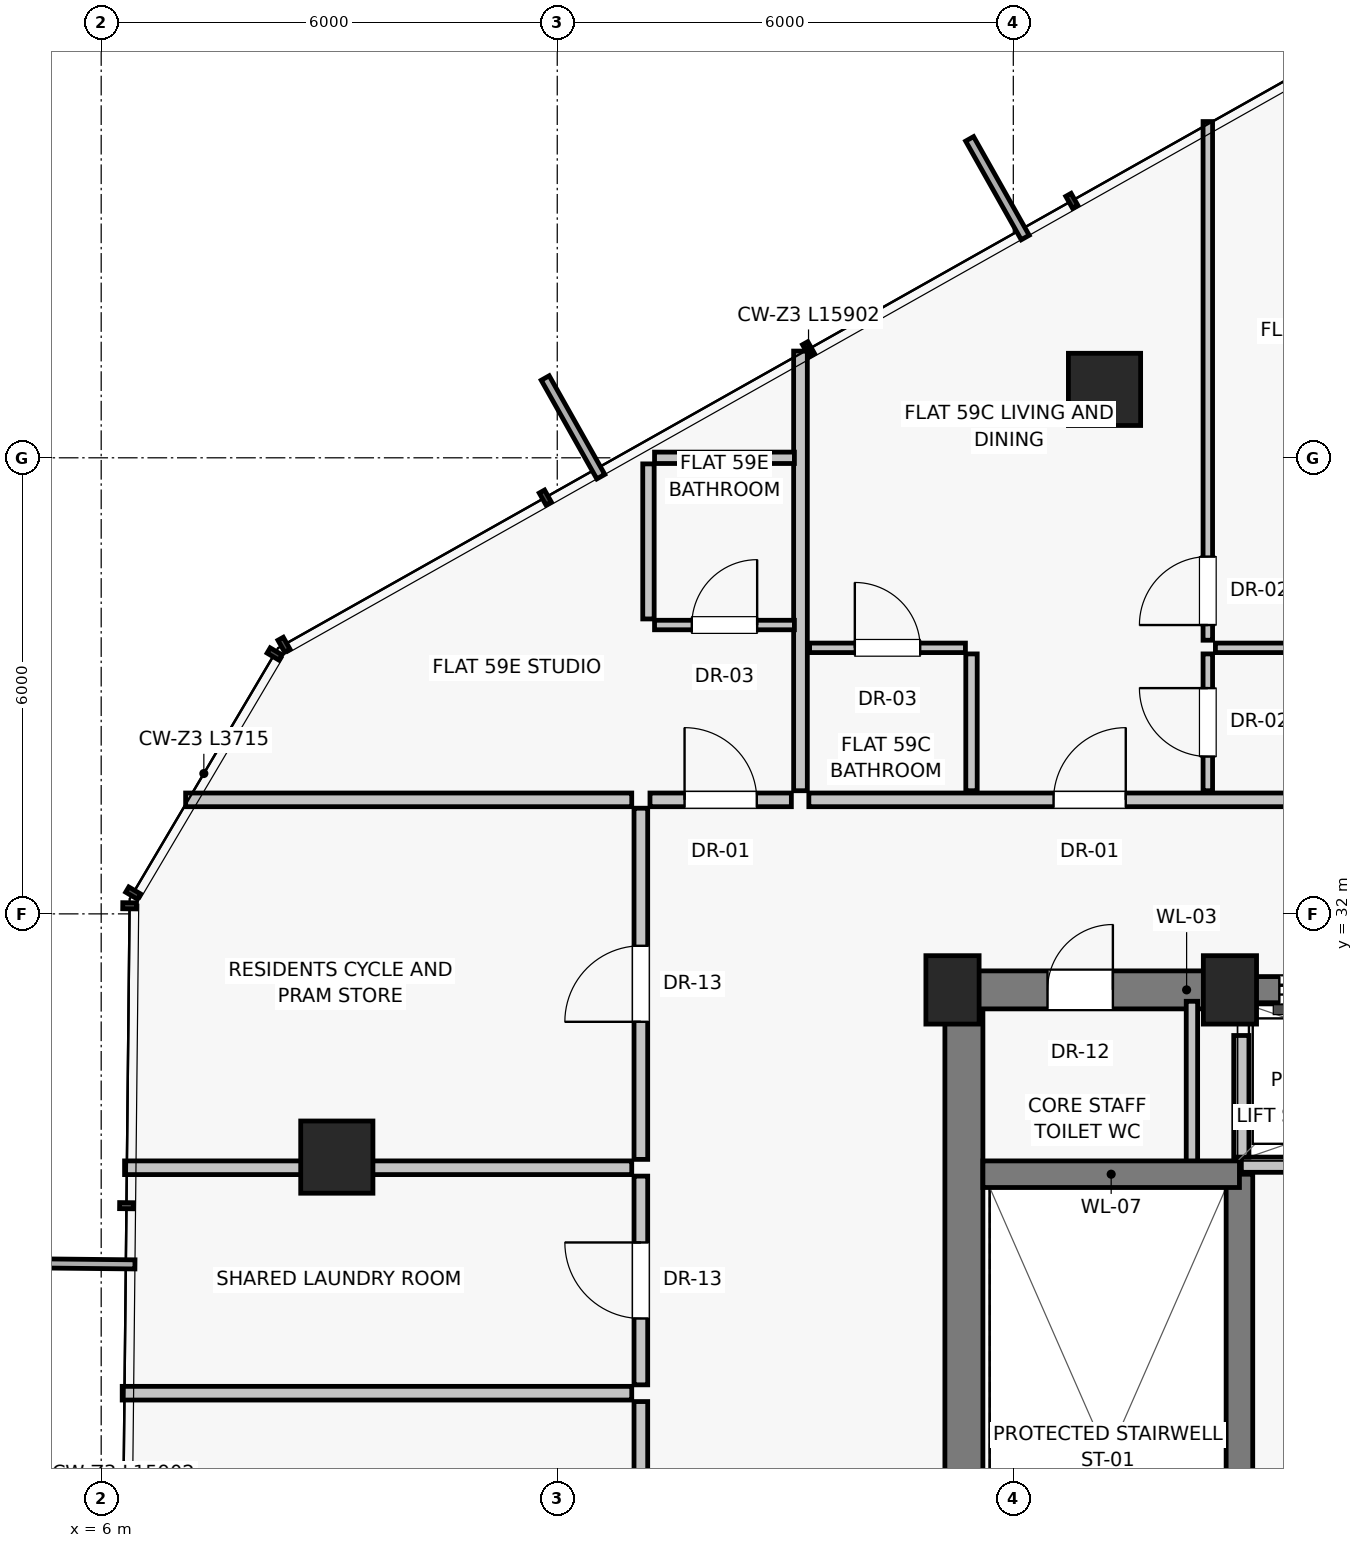
"""IFC4 building model, lengths in metres.
Left out: names, types, materials, properties, quantities, classifications, styles, units other than length and angle.
Written with IfcOpenShell. Run it as: python <this file> out.ifc"""

import sys

from ifc_helpers import new_model, si_unit, direction, frame, frame_2d, origin, origin_2d, place, context, subcontext, project, spatial, rectangle, extrude, source, transform, mapped, element, fill, save


model = new_model("IFC4")
c1 = context("Model", 3, precision=1e-05, world=origin(), true_north=direction((0.0, 1.0)))
c2 = subcontext(c1, "Body", "Model", "MODEL_VIEW")
j1 = project(units=[si_unit("LENGTHUNIT", "METRE"), si_unit("PLANEANGLEUNIT", "RADIAN")], contexts=[c1])
p1 = place(None, origin())
s1 = spatial("IfcSite", under=j1, at=p1, CompositionType="ELEMENT")
p2 = place(p1, origin())
s2 = spatial("IfcBuilding", under=s1, at=p2, CompositionType="ELEMENT")
p3 = place(p2, frame((0.0, 0.0, 208.1)))
s3 = spatial("IfcBuildingStorey", under=s2, at=p3, CompositionType="ELEMENT", Elevation=208.1)
for number, where, z_axis, x_axis in (
    (1, (17.2, 31.0, 0.0), (0.0, 0.0, 1.0), (1.0, 0.0, 0.0)),
    (2, (20.85, 31.0, 0.0), (0.0, 0.0, 1.0), (1.0, 0.0, 0.0)),
):
    element("IfcColumn", number, at=place(p3, frame(where, z_axis=z_axis, x_axis=x_axis)), inside=s3, PredefinedType="PILASTER", context=c2, shape_type="SweptSolid", body=[
        extrude(rectangle(XDim=0.7, YDim=0.9, at=origin_2d()), origin(), (0.0, 0.0, 1.0), 3.25),
    ])
for number, where, z_axis, x_axis in (
    (3, (19.2, 38.9, 0.0), (0.0, 0.0, 1.0), (1.0, 0.0, 0.0)),
    (4, (9.1, 28.8, 0.0), (0.0, 0.0, 1.0), (1.0, 0.0, 0.0)),
):
    element("IfcColumn", number, at=place(p3, frame(where, z_axis=z_axis, x_axis=x_axis)), inside=s3, PredefinedType="COLUMN", context=c2, shape_type="SweptSolid", body=[
        extrude(rectangle(XDim=0.95, YDim=0.95, at=origin_2d()), origin(), (0.0, 0.0, 1.0), 3.25),
    ])
p4 = place(p3, frame((17.35, 16.8, 0.0), z_axis=(0.0, 0.0, 1.0), x_axis=(0.0, 1.0, 0.0)))
e5 = element("IfcWall", 5, at=p4, inside=s3, PredefinedType="SHEAR", context=c2, shape_type="SweptSolid", body=[
    extrude(rectangle(XDim=14.2, YDim=0.5, at=frame_2d((7.1, 0.0))), origin(), (0.0, 0.0, 1.0), 2.97),
])
p5 = place(p3, frame((17.2, 31.0, 0.0), z_axis=(0.0, 0.0, 1.0), x_axis=(1.0, 0.0, 0.0)))
e6 = element("IfcWall", 6, at=p5, inside=s3, PredefinedType="SHEAR", context=c2, shape_type="SweptSolid", body=[
    extrude(rectangle(XDim=3.8, YDim=0.5, at=frame_2d((1.9, 0.0))), origin(), (0.0, 0.0, 1.0), 2.97),
])
p6 = place(p5, frame((1.25, 0.0, 0.0)))
e7 = element("IfcOpeningElement", 7, at=p6, cuts=e6, PredefinedType="OPENING", context=c2, shape_type="SweptSolid", body=[
    extrude(rectangle(XDim=0.86, YDim=2.01, at=frame_2d((0.43, 1.005))), frame((0.0, 0.26, 0.0), z_axis=(0.0, -1.0, 0.0), x_axis=(1.0, 0.0, 0.0)), (0.0, 0.0, 1.0), 0.52),
])
p7 = place(p3, frame((21.0, 31.0, 0.0), z_axis=(0.0, 0.0, 1.0), x_axis=(1.0, 0.0, 0.0)))
e8 = element("IfcWall", 8, at=p7, inside=s3, PredefinedType="SHEAR", context=c2, shape_type="SweptSolid", body=[
    extrude(rectangle(XDim=6.0, YDim=0.35, at=frame_2d((3.0, 0.0))), origin(), (0.0, 0.0, 1.0), 2.97),
])
p8 = place(p7, frame((0.5, 0.0, 0.0)))
e9 = element("IfcOpeningElement", 9, at=p8, cuts=e8, PredefinedType="OPENING", context=c2, shape_type="SweptSolid", body=[
    extrude(rectangle(XDim=1.1, YDim=2.08, at=frame_2d((0.55, 1.04))), frame((0.0, 0.185, 0.0), z_axis=(0.0, -1.0, 0.0), x_axis=(1.0, 0.0, 0.0)), (0.0, 0.0, 1.0), 0.37),
])
p9 = place(p7, frame((2.45, 0.0, 0.0)))
e10 = element("IfcOpeningElement", 10, at=p9, cuts=e8, PredefinedType="OPENING", context=c2, shape_type="SweptSolid", body=[
    extrude(rectangle(XDim=1.1, YDim=2.08, at=frame_2d((0.55, 1.04))), frame((0.0, 0.185, 0.0), z_axis=(0.0, -1.0, 0.0), x_axis=(1.0, 0.0, 0.0)), (0.0, 0.0, 1.0), 0.37),
])
p10 = place(p7, frame((4.4, 0.0, 0.0)))
e11 = element("IfcOpeningElement", 11, at=p10, cuts=e8, PredefinedType="OPENING", context=c2, shape_type="SweptSolid", body=[
    extrude(rectangle(XDim=1.1, YDim=2.08, at=frame_2d((0.55, 1.04))), frame((0.0, 0.185, 0.0), z_axis=(0.0, -1.0, 0.0), x_axis=(1.0, 0.0, 0.0)), (0.0, 0.0, 1.0), 0.37),
])
p11 = place(p3, frame((20.35, 28.65, 0.0), z_axis=(0.0, 0.0, 1.0), x_axis=(0.0, 1.0, 0.0)))
e12 = element("IfcWall", 12, at=p11, inside=s3, PredefinedType="PARTITIONING", context=c2, shape_type="SweptSolid", body=[
    extrude(rectangle(XDim=2.2, YDim=0.15, at=frame_2d((1.1, 0.0))), origin(), (0.0, 0.0, 1.0), 2.97),
])
p12 = place(p3, frame((20.975, 19.8, 0.0), z_axis=(0.0, 0.0, 1.0), x_axis=(0.0, 1.0, 0.0)))
e13 = element("IfcWall", 13, at=p12, inside=s3, PredefinedType="SHEAR", context=c2, shape_type="SweptSolid", body=[
    extrude(rectangle(XDim=8.775, YDim=0.35, at=frame_2d((4.387, 0.0))), origin(), (0.0, 0.0, 1.0), 2.97),
])
p13 = place(p3, frame((17.6, 28.575, 0.0), z_axis=(0.0, 0.0, 1.0), x_axis=(1.0, 0.0, 0.0)))
e14 = element("IfcWall", 14, at=p13, inside=s3, PredefinedType="SHEAR", context=c2, shape_type="SweptSolid", body=[
    extrude(rectangle(XDim=3.375, YDim=0.35, at=frame_2d((1.688, 0.0))), origin(), (0.0, 0.0, 1.0), 2.97),
])
p14 = place(p3, frame((21.0, 28.7, 0.0), z_axis=(0.0, 0.0, 1.0), x_axis=(1.0, 0.0, 0.0)))
e15 = element("IfcWall", 15, at=p14, inside=s3, PredefinedType="SOLIDWALL", context=c2, shape_type="SweptSolid", body=[
    extrude(rectangle(XDim=6.0, YDim=0.2, at=frame_2d((3.0, 0.0))), origin(), (0.0, 0.0, 1.0), 2.97),
])
p15 = place(p3, frame((21.0, 28.8, 0.0), z_axis=(0.0, 0.0, 1.0), x_axis=(0.0, 1.0, 0.0)))
e16 = element("IfcWall", 16, at=p15, inside=s3, PredefinedType="SOLIDWALL", context=c2, shape_type="SweptSolid", body=[
    extrude(rectangle(XDim=1.6, YDim=0.2, at=frame_2d((0.8, 0.0))), origin(), (0.0, 0.0, 1.0), 2.97),
])
p16 = place(p3, frame((15.2, 33.62, 0.0), z_axis=(0.0, 0.0, 1.0), x_axis=(0.0, 1.0, 0.0)))
e17 = element("IfcWall", 17, at=p16, inside=s3, PredefinedType="PARTITIONING", context=c2, shape_type="SweptSolid", body=[
    extrude(rectangle(XDim=5.784, YDim=0.18, at=frame_2d((2.892, 0.0))), origin(), (0.0, 0.0, 1.0), 2.97),
])
p17 = place(p3, frame((15.31, 33.5, 0.0), z_axis=(0.0, 0.0, 1.0), x_axis=(1.0, 0.0, 0.0)))
e18 = element("IfcWall", 18, at=p17, inside=s3, PredefinedType="PARTITIONING", context=c2, shape_type="SweptSolid", body=[
    extrude(rectangle(XDim=9.35, YDim=0.18, at=frame_2d((4.675, 0.0))), origin(), (0.0, 0.0, 1.0), 2.97),
])
p18 = place(p17, frame((3.219, 0.0, 0.0)))
e19 = element("IfcOpeningElement", 19, at=p18, cuts=e18, PredefinedType="OPENING", context=c2, shape_type="SweptSolid", body=[
    extrude(rectangle(XDim=0.95, YDim=2.02, at=frame_2d((0.475, 1.01))), frame((0.0, 0.1, 0.0), z_axis=(0.0, -1.0, 0.0), x_axis=(1.0, 0.0, 0.0)), (0.0, 0.0, 1.0), 0.2),
])
p19 = place(p3, frame((17.45, 33.62, 0.0), z_axis=(0.0, 0.0, 1.0), x_axis=(0.0, 1.0, 0.0)))
e20 = element("IfcWall", 20, at=p19, inside=s3, PredefinedType="PARTITIONING", context=c2, shape_type="SweptSolid", body=[
    extrude(rectangle(XDim=1.8, YDim=0.15, at=frame_2d((0.9, 0.0))), origin(), (0.0, 0.0, 1.0), 2.97),
])
p20 = place(p3, frame((15.32, 35.5, 0.0), z_axis=(0.0, 0.0, 1.0), x_axis=(1.0, 0.0, 0.0)))
e21 = element("IfcWall", 21, at=p20, inside=s3, PredefinedType="PARTITIONING", context=c2, shape_type="SweptSolid", body=[
    extrude(rectangle(XDim=2.05, YDim=0.125, at=frame_2d((1.025, 0.0))), origin(), (0.0, 0.0, 1.0), 2.97),
])
p21 = place(p20, frame((0.595, 0.0, 0.0)))
e22 = element("IfcOpeningElement", 22, at=p21, cuts=e21, PredefinedType="OPENING", context=c2, shape_type="SweptSolid", body=[
    extrude(rectangle(XDim=0.86, YDim=2.01, at=frame_2d((0.43, 1.005))), frame((0.0, 0.073, 0.0), z_axis=(0.0, -1.0, 0.0), x_axis=(1.0, 0.0, 0.0)), (0.0, 0.0, 1.0), 0.145),
])
p22 = place(p3, frame((20.559, 33.62, 0.0), z_axis=(0.0, 0.0, 1.0), x_axis=(0.0, 1.0, 0.0)))
e23 = element("IfcWall", 23, at=p22, inside=s3, PredefinedType="PARTITIONING", context=c2, shape_type="SweptSolid", body=[
    extrude(rectangle(XDim=1.8, YDim=0.125, at=frame_2d((0.9, 0.0))), origin(), (0.0, 0.0, 1.0), 2.424),
])
p23 = place(p22, frame((0.45, 0.0, 0.0)))
e24 = element("IfcOpeningElement", 24, at=p23, cuts=e23, PredefinedType="OPENING", context=c2, shape_type="SweptSolid", body=[
    extrude(rectangle(XDim=0.9, YDim=2.01, at=frame_2d((0.45, 1.005))), frame((0.0, 0.073, 0.0), z_axis=(0.0, -1.0, 0.0), x_axis=(1.0, 0.0, 0.0)), (0.0, 0.0, 1.0), 0.145),
])
p24 = place(p3, frame((20.659, 35.5, 0.0), z_axis=(0.0, 0.0, 1.0), x_axis=(1.0, 0.0, 0.0)))
e25 = element("IfcWall", 25, at=p24, inside=s3, PredefinedType="PARTITIONING", context=c2, shape_type="SweptSolid", body=[
    extrude(rectangle(XDim=3.991, YDim=0.125, at=frame_2d((1.996, 0.0))), origin(), (0.0, 0.0, 1.0), 2.617),
])
p25 = place(p3, frame((20.559, 35.6, 0.0), z_axis=(0.0, 0.0, 1.0), x_axis=(0.0, 1.0, 0.0)))
e26 = element("IfcWall", 26, at=p25, inside=s3, PredefinedType="PARTITIONING", context=c2, shape_type="SweptSolid", body=[
    extrude(rectangle(XDim=6.823, YDim=0.125, at=frame_2d((3.412, 0.0))), origin(), (0.0, 0.0, 1.0), 2.97),
])
p26 = place(p25, frame((0.2, 0.0, 0.0)))
e27 = element("IfcOpeningElement", 27, at=p26, cuts=e26, PredefinedType="OPENING", context=c2, shape_type="SweptSolid", body=[
    extrude(rectangle(XDim=0.9, YDim=2.01, at=frame_2d((0.45, 1.005))), frame((0.0, 0.073, 0.0), z_axis=(0.0, -1.0, 0.0), x_axis=(1.0, 0.0, 0.0)), (0.0, 0.0, 1.0), 0.145),
])
p27 = place(p3, frame((12.98, 33.5, 0.0), z_axis=(0.0, 0.0, 1.0), x_axis=(-1.0, 0.0, 0.0)))
e28 = element("IfcWall", 28, at=p27, inside=s3, PredefinedType="PARTITIONING", context=c2, shape_type="SweptSolid", body=[
    extrude(rectangle(XDim=5.869, YDim=0.18, at=frame_2d((2.935, 0.0))), origin(), (0.0, 0.0, 1.0), 2.97),
])
p28 = place(p3, frame((13.1, 18.74, 0.0), z_axis=(0.0, 0.0, 1.0), x_axis=(0.0, 1.0, 0.0)))
e29 = element("IfcWall", 29, at=p28, inside=s3, PredefinedType="PARTITIONING", context=c2, shape_type="SweptSolid", body=[
    extrude(rectangle(XDim=6.844, YDim=0.18, at=frame_2d((3.422, 0.0))), origin(), (0.0, 0.0, 1.0), 2.617),
])
p29 = place(p28, frame((2.922, 0.0, 0.0)))
e30 = element("IfcOpeningElement", 30, at=p29, cuts=e29, PredefinedType="OPENING", context=c2, shape_type="SweptSolid", body=[
    extrude(rectangle(XDim=1.0, YDim=2.01, at=frame_2d((0.5, 1.005))), frame((0.0, 0.1, 0.0), z_axis=(0.0, -1.0, 0.0), x_axis=(1.0, 0.0, 0.0)), (0.0, 0.0, 1.0), 0.2),
])
p30 = place(p3, frame((12.98, 25.694, 0.0), z_axis=(0.0, 0.0, 1.0), x_axis=(-1.0, 0.0, 0.0)))
e31 = element("IfcWall", 31, at=p30, inside=s3, PredefinedType="PARTITIONING", context=c2, shape_type="SweptSolid", body=[
    extrude(rectangle(XDim=6.703, YDim=0.18, at=frame_2d((3.352, 0.0))), origin(), (0.0, 0.0, 1.0), 2.97),
])
p31 = place(p3, frame((13.1, 25.804, 0.0), z_axis=(0.0, 0.0, 1.0), x_axis=(0.0, 1.0, 0.0)))
e32 = element("IfcWall", 32, at=p31, inside=s3, PredefinedType="PARTITIONING", context=c2, shape_type="SweptSolid", body=[
    extrude(rectangle(XDim=2.746, YDim=0.18, at=frame_2d((1.373, 0.0))), origin(), (0.0, 0.0, 1.0), 2.617),
])
p32 = place(p31, frame((0.873, 0.0, 0.0)))
e33 = element("IfcOpeningElement", 33, at=p32, cuts=e32, PredefinedType="OPENING", context=c2, shape_type="SweptSolid", body=[
    extrude(rectangle(XDim=1.0, YDim=2.01, at=frame_2d((0.5, 1.005))), frame((0.0, 0.1, 0.0), z_axis=(0.0, -1.0, 0.0), x_axis=(1.0, 0.0, 0.0)), (0.0, 0.0, 1.0), 0.2),
])
p33 = place(p3, frame((13.1, 28.77, 0.0), z_axis=(0.0, 0.0, 1.0), x_axis=(0.0, 1.0, 0.0)))
e34 = element("IfcWall", 34, at=p33, inside=s3, PredefinedType="PARTITIONING", context=c2, shape_type="SweptSolid", body=[
    extrude(rectangle(XDim=4.62, YDim=0.18, at=frame_2d((2.31, 0.0))), origin(), (0.0, 0.0, 1.0), 2.617),
])
p34 = place(p33, frame((1.81, 0.0, 0.0)))
e35 = element("IfcOpeningElement", 35, at=p34, cuts=e34, PredefinedType="OPENING", context=c2, shape_type="SweptSolid", body=[
    extrude(rectangle(XDim=1.0, YDim=2.01, at=frame_2d((0.5, 1.005))), frame((0.0, 0.1, 0.0), z_axis=(0.0, -1.0, 0.0), x_axis=(1.0, 0.0, 0.0)), (0.0, 0.0, 1.0), 0.2),
])
p35 = place(p3, frame((12.98, 28.66, 0.0), z_axis=(0.0, 0.0, 1.0), x_axis=(-1.0, 0.0, 0.0)))
e36 = element("IfcWall", 36, at=p35, inside=s3, PredefinedType="PARTITIONING", context=c2, shape_type="SweptSolid", body=[
    extrude(rectangle(XDim=6.672, YDim=0.18, at=frame_2d((3.336, 0.0))), origin(), (0.0, 0.0, 1.0), 2.424),
])
p36 = place(p3, frame((13.22, 33.5, 0.0), z_axis=(0.0, 0.0, 1.0), x_axis=(1.0, 0.0, 0.0)))
e37 = element("IfcWall", 37, at=p36, inside=s3, PredefinedType="PARTITIONING", context=c2, shape_type="SweptSolid", body=[
    extrude(rectangle(XDim=1.86, YDim=0.18, at=frame_2d((0.93, 0.0))), origin(), (0.0, 0.0, 1.0), 2.97),
])
p37 = place(p36, frame((0.455, 0.0, 0.0)))
e38 = element("IfcOpeningElement", 38, at=p37, cuts=e37, PredefinedType="OPENING", context=c2, shape_type="SweptSolid", body=[
    extrude(rectangle(XDim=0.95, YDim=2.02, at=frame_2d((0.475, 1.01))), frame((0.0, 0.1, 0.0), z_axis=(0.0, -1.0, 0.0), x_axis=(1.0, 0.0, 0.0)), (0.0, 0.0, 1.0), 0.2),
])
p38 = place(p3, frame((13.28, 35.8, 0.0), z_axis=(0.0, 0.0, 1.0), x_axis=(1.0, 0.0, 0.0)))
e39 = element("IfcWall", 39, at=p38, inside=s3, PredefinedType="PARTITIONING", context=c2, shape_type="SweptSolid", body=[
    extrude(rectangle(XDim=1.84, YDim=0.125, at=frame_2d((0.92, 0.0))), origin(), (0.0, 0.0, 1.0), 2.97),
])
p39 = place(p38, frame((0.49, 0.0, 0.0)))
e40 = element("IfcOpeningElement", 40, at=p39, cuts=e39, PredefinedType="OPENING", context=c2, shape_type="SweptSolid", body=[
    extrude(rectangle(XDim=0.86, YDim=2.01, at=frame_2d((0.43, 1.005))), frame((0.0, 0.073, 0.0), z_axis=(0.0, -1.0, 0.0), x_axis=(1.0, 0.0, 0.0)), (0.0, 0.0, 1.0), 0.145),
])
p40 = place(p3, frame((13.28, 38.0, 0.0), z_axis=(0.0, 0.0, 1.0), x_axis=(1.0, 0.0, 0.0)))
e41 = element("IfcWall", 41, at=p40, inside=s3, PredefinedType="PARTITIONING", context=c2, shape_type="SweptSolid", body=[
    extrude(rectangle(XDim=1.84, YDim=0.15, at=frame_2d((0.92, 0.0))), origin(), (0.0, 0.0, 1.0), 2.97),
])
p41 = place(p3, frame((13.2, 35.88, 0.0), z_axis=(0.0, 0.0, 1.0), x_axis=(0.0, 1.0, 0.0)))
e42 = element("IfcWall", 42, at=p41, inside=s3, PredefinedType="PARTITIONING", context=c2, shape_type="SweptSolid", body=[
    extrude(rectangle(XDim=2.04, YDim=0.15, at=frame_2d((1.02, 0.0))), origin(), (0.0, 0.0, 1.0), 2.97),
])
m1 = source(origin(), c2, "Body", "SweptSolid", [
    extrude(rectangle(XDim=0.86, YDim=2.01, at=frame_2d((0.43, 1.005))), frame((0.0, 0.025, 0.0), z_axis=(0.0, -1.0, 0.0), x_axis=(1.0, 0.0, 0.0)), (0.0, 0.0, 1.0), 0.05),
])
p42 = place(p6, origin())
e43 = element("IfcDoor", 43, at=p42, inside=s3, OperationType="SINGLE_SWING_RIGHT", PredefinedType="DOOR", context=c2, shape_type="MappedRepresentation", body=[
    mapped(m1, transform((0.0, 0.0, 0.0), scale=1.0)),
])
fill(e7, e43)
m2 = source(origin(), c2, "Body", "SweptSolid", [
    extrude(rectangle(XDim=1.1, YDim=2.08, at=frame_2d((0.55, 1.04))), frame((0.0, 0.025, 0.0), z_axis=(0.0, -1.0, 0.0), x_axis=(1.0, 0.0, 0.0)), (0.0, 0.0, 1.0), 0.05),
])
p43 = place(p8, origin())
e44 = element("IfcDoor", 44, at=p43, inside=s3, OperationType="SLIDING_TO_LEFT", PredefinedType="DOOR", context=c2, shape_type="MappedRepresentation", body=[
    mapped(m2, transform((0.0, 0.0, 0.0), scale=1.0)),
])
fill(e9, e44)
m3 = source(origin(), c2, "Body", "SweptSolid", [
    extrude(rectangle(XDim=0.95, YDim=2.02, at=frame_2d((0.475, 1.01))), frame((0.0, 0.025, 0.0), z_axis=(0.0, -1.0, 0.0), x_axis=(1.0, 0.0, 0.0)), (0.0, 0.0, 1.0), 0.05),
])
p44 = place(p18, origin())
e45 = element("IfcDoor", 45, at=p44, inside=s3, OperationType="SINGLE_SWING_RIGHT", PredefinedType="DOOR", context=c2, shape_type="MappedRepresentation", body=[
    mapped(m3, transform((0.0, 0.0, 0.0), scale=1.0)),
])
fill(e19, e45)
p45 = place(p21, origin())
e46 = element("IfcDoor", 46, at=p45, inside=s3, OperationType="SINGLE_SWING_LEFT", PredefinedType="DOOR", context=c2, shape_type="MappedRepresentation", body=[
    mapped(m1, transform((0.0, 0.0, 0.0), scale=1.0)),
])
fill(e22, e46)
m4 = source(origin(), c2, "Body", "SweptSolid", [
    extrude(rectangle(XDim=0.9, YDim=2.01, at=frame_2d((0.45, 1.005))), frame((0.0, 0.025, 0.0), z_axis=(0.0, -1.0, 0.0), x_axis=(1.0, 0.0, 0.0)), (0.0, 0.0, 1.0), 0.05),
])
p46 = place(p23, origin())
e47 = element("IfcDoor", 47, at=p46, inside=s3, OperationType="SINGLE_SWING_RIGHT", PredefinedType="DOOR", context=c2, shape_type="MappedRepresentation", body=[
    mapped(m4, transform((0.0, 0.0, 0.0), scale=1.0)),
])
fill(e24, e47)
p47 = place(p26, origin())
e48 = element("IfcDoor", 48, at=p47, inside=s3, OperationType="SINGLE_SWING_LEFT", PredefinedType="DOOR", context=c2, shape_type="MappedRepresentation", body=[
    mapped(m4, transform((0.0, 0.0, 0.0), scale=1.0)),
])
fill(e27, e48)
m5 = source(origin(), c2, "Body", "SweptSolid", [
    extrude(rectangle(XDim=1.0, YDim=2.01, at=frame_2d((0.5, 1.005))), frame((0.0, 0.025, 0.0), z_axis=(0.0, -1.0, 0.0), x_axis=(1.0, 0.0, 0.0)), (0.0, 0.0, 1.0), 0.05),
])
p48 = place(p32, origin())
e49 = element("IfcDoor", 49, at=p48, inside=s3, OperationType="SINGLE_SWING_RIGHT", PredefinedType="DOOR", context=c2, shape_type="MappedRepresentation", body=[
    mapped(m5, transform((0.0, 0.0, 0.0), scale=1.0)),
])
fill(e33, e49)
p49 = place(p34, origin())
e50 = element("IfcDoor", 50, at=p49, inside=s3, OperationType="SINGLE_SWING_LEFT", PredefinedType="DOOR", context=c2, shape_type="MappedRepresentation", body=[
    mapped(m5, transform((0.0, 0.0, 0.0), scale=1.0)),
])
fill(e35, e50)
p50 = place(p37, origin())
e51 = element("IfcDoor", 51, at=p50, inside=s3, OperationType="SINGLE_SWING_LEFT", PredefinedType="DOOR", context=c2, shape_type="MappedRepresentation", body=[
    mapped(m3, transform((0.0, 0.0, 0.0), scale=1.0)),
])
fill(e38, e51)
p51 = place(p39, origin())
e52 = element("IfcDoor", 52, at=p51, inside=s3, OperationType="SINGLE_SWING_RIGHT", PredefinedType="DOOR", context=c2, shape_type="MappedRepresentation", body=[
    mapped(m1, transform((0.0, 0.0, 0.0), scale=1.0)),
])
fill(e40, e52)
save(model, sys.argv[1])
